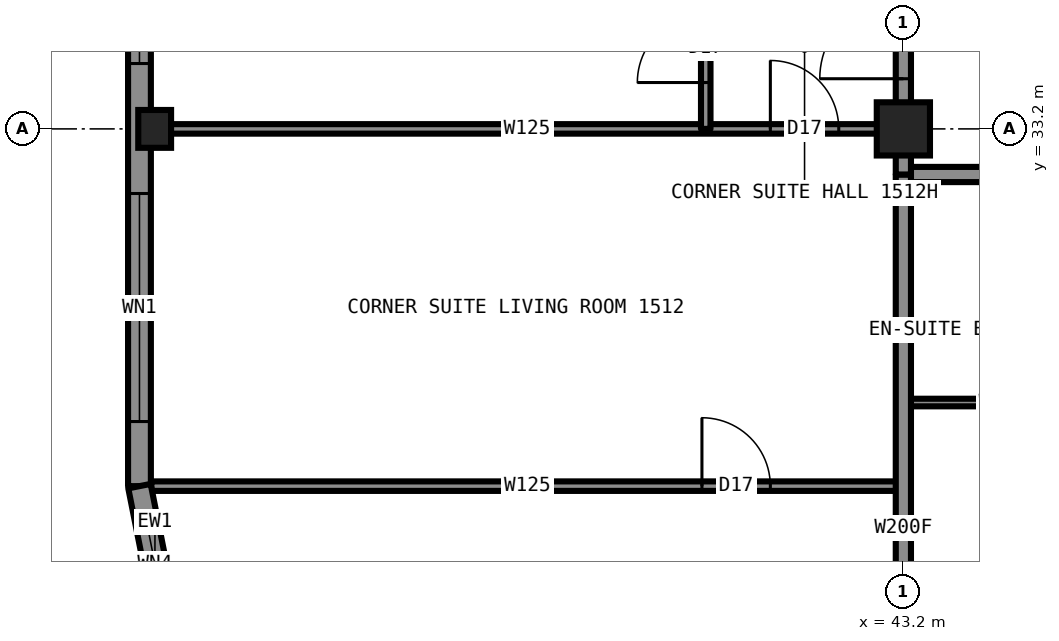
"""IFC4 building model, lengths in metres.
Left out: names, types, materials, properties, quantities, classifications, styles, units other than length and angle.
Written with IfcOpenShell. Run it as: python <this file> out.ifc"""

import sys

from ifc_helpers import new_model, si_unit, direction, frame, frame_2d, origin, origin_2d, place, context, subcontext, project, spatial, rectangle, hollow_rectangle, i_section, extrude, element, fill, save


model = new_model("IFC4")
c1 = context("Model", 3, precision=1e-05, world=origin(), true_north=direction((0.0, 1.0)))
c2 = subcontext(c1, "Body", "Model", "MODEL_VIEW")
j1 = project(units=[si_unit("LENGTHUNIT", "METRE"), si_unit("PLANEANGLEUNIT", "RADIAN")], contexts=[c1])
p1 = place(None, origin())
s1 = spatial("IfcSite", under=j1, at=p1, CompositionType="ELEMENT")
p2 = place(p1, origin())
s2 = spatial("IfcBuilding", under=s1, at=p2, CompositionType="ELEMENT")
p3 = place(p2, frame((0.0, 0.0, 60.0)))
s3 = spatial("IfcBuildingStorey", under=s2, at=p3, CompositionType="ELEMENT", Elevation=60.0)
p4 = place(p3, frame((33.35, 33.2, 0.0), z_axis=(0.0, 0.0, 1.0), x_axis=(1.0, 0.0, 0.0)))
e1 = element("IfcColumn", 1, at=p4, inside=s3, PredefinedType="COLUMN", context=c2, shape_type="SweptSolid", body=[
    extrude(i_section(OverallWidth=0.432, OverallDepth=0.498, WebThickness=0.056, FlangeThickness=0.089, at=origin_2d()), origin(), (0.0, 0.0, 1.0), 3.5),
])
p5 = place(p3, frame((43.2, 33.2, 0.0), z_axis=(0.0, 0.0, 1.0), x_axis=(1.0, 0.0, 0.0)))
e2 = element("IfcColumn", 2, at=p5, inside=s3, PredefinedType="COLUMN", context=c2, shape_type="SweptSolid", body=[
    extrude(hollow_rectangle(XDim=0.7, YDim=0.7, WallThickness=0.06, at=origin_2d()), origin(), (0.0, 0.0, 1.0), 3.5),
])
p6 = place(p3, frame((33.3, 33.2, 0.0), z_axis=(0.0, 0.0, 1.0), x_axis=(1.0, 0.0, 0.0)))
e3 = element("IfcWall", 3, at=p6, inside=s3, PredefinedType="PARTITIONING", context=c2, shape_type="SweptSolid", body=[
    extrude(rectangle(XDim=9.9, YDim=0.125, at=frame_2d((4.95, 0.0))), origin(), (0.0, 0.0, 1.0), 2.573),
])
p7 = place(p6, frame((8.15, 0.0, 0.0)))
e4 = element("IfcOpeningElement", 4, at=p7, cuts=e3, PredefinedType="OPENING", context=c2, shape_type="SweptSolid", body=[
    extrude(rectangle(XDim=0.9, YDim=2.2, at=frame_2d((0.45, 1.1))), frame((0.0, 0.073, 0.0), z_axis=(0.0, -1.0, 0.0), x_axis=(1.0, 0.0, 0.0)), (0.0, 0.0, 1.0), 0.145),
])
p8 = place(p3, frame((43.2, 32.6, 0.0), z_axis=(0.0, 0.0, 1.0), x_axis=(1.0, 0.0, 0.0)))
e5 = element("IfcWall", 5, at=p8, inside=s3, PredefinedType="PARTITIONING", context=c2, shape_type="SweptSolid", body=[
    extrude(rectangle(XDim=23.6, YDim=0.2, at=frame_2d((11.8, 0.0))), origin(), (0.0, 0.0, 1.0), 3.33),
])
p9 = place(p8, frame((3.0, 0.0, 0.0)))
e6 = element("IfcOpeningElement", 6, at=p9, cuts=e5, PredefinedType="OPENING", context=c2, shape_type="SweptSolid", body=[
    extrude(rectangle(XDim=1.0, YDim=2.2, at=frame_2d((0.5, 1.1))), frame((0.0, 0.11, 0.0), z_axis=(0.0, -1.0, 0.0), x_axis=(1.0, 0.0, 0.0)), (0.0, 0.0, 1.0), 0.22),
])
p10 = place(p8, frame((12.44, 0.0, 0.0)))
e7 = element("IfcOpeningElement", 7, at=p10, cuts=e5, PredefinedType="OPENING", context=c2, shape_type="SweptSolid", body=[
    extrude(rectangle(XDim=1.0, YDim=2.2, at=frame_2d((0.5, 1.1))), frame((0.0, 0.11, 0.0), z_axis=(0.0, -1.0, 0.0), x_axis=(1.0, 0.0, 0.0)), (0.0, 0.0, 1.0), 0.22),
])
p11 = place(p8, frame((20.34, 0.0, 0.0)))
e8 = element("IfcOpeningElement", 8, at=p11, cuts=e5, PredefinedType="OPENING", context=c2, shape_type="SweptSolid", body=[
    extrude(rectangle(XDim=1.0, YDim=2.2, at=frame_2d((0.5, 1.1))), frame((0.0, 0.11, 0.0), z_axis=(0.0, -1.0, 0.0), x_axis=(1.0, 0.0, 0.0)), (0.0, 0.0, 1.0), 0.22),
])
p12 = place(p3, frame((43.2, 29.6, 0.0), z_axis=(0.0, 0.0, 1.0), x_axis=(1.0, 0.0, 0.0)))
e9 = element("IfcWall", 9, at=p12, inside=s3, PredefinedType="PARTITIONING", context=c2, shape_type="SweptSolid", body=[
    extrude(rectangle(XDim=2.6, YDim=0.1, at=frame_2d((1.3, 0.0))), origin(), (0.0, 0.0, 1.0), 3.33),
])
p13 = place(p3, frame((33.306, 28.5, 0.0), z_axis=(0.0, 0.0, 1.0), x_axis=(1.0, 0.0, 0.0)))
e10 = element("IfcWall", 10, at=p13, inside=s3, PredefinedType="PARTITIONING", context=c2, shape_type="SweptSolid", body=[
    extrude(rectangle(XDim=9.894, YDim=0.125, at=frame_2d((4.947, 0.0))), origin(), (0.0, 0.0, 1.0), 3.33),
])
p14 = place(p13, frame((7.244, 0.0, 0.0)))
e11 = element("IfcOpeningElement", 11, at=p14, cuts=e10, PredefinedType="OPENING", context=c2, shape_type="SweptSolid", body=[
    extrude(rectangle(XDim=0.9, YDim=2.2, at=frame_2d((0.45, 1.1))), frame((0.0, 0.073, 0.0), z_axis=(0.0, -1.0, 0.0), x_axis=(1.0, 0.0, 0.0)), (0.0, 0.0, 1.0), 0.145),
])
p15 = place(p3, frame((43.2, 33.22, 0.0), z_axis=(0.0, 0.0, 1.0), x_axis=(0.0, 1.0, 0.0)))
e12 = element("IfcWall", 12, at=p15, inside=s3, PredefinedType="PARTITIONING", context=c2, shape_type="SweptSolid", body=[
    extrude(rectangle(XDim=23.58, YDim=0.2, at=frame_2d((11.79, 0.0))), origin(), (0.0, 0.0, 1.0), 3.33),
])
p16 = place(p15, frame((7.7, 0.0, 0.0)))
e13 = element("IfcOpeningElement", 13, at=p16, cuts=e12, PredefinedType="OPENING", context=c2, shape_type="SweptSolid", body=[
    extrude(rectangle(XDim=1.0, YDim=2.2, at=frame_2d((0.5, 1.1))), frame((0.0, 0.11, 0.0), z_axis=(0.0, -1.0, 0.0), x_axis=(1.0, 0.0, 0.0)), (0.0, 0.0, 1.0), 0.22),
])
p17 = place(p15, frame((16.4, 0.0, 0.0)))
e14 = element("IfcOpeningElement", 14, at=p17, cuts=e12, PredefinedType="OPENING", context=c2, shape_type="SweptSolid", body=[
    extrude(rectangle(XDim=1.0, YDim=2.2, at=frame_2d((0.5, 1.1))), frame((0.0, 0.11, 0.0), z_axis=(0.0, -1.0, 0.0), x_axis=(1.0, 0.0, 0.0)), (0.0, 0.0, 1.0), 0.22),
])
p18 = place(p15, frame((21.82, 0.0, 0.0)))
e15 = element("IfcOpeningElement", 15, at=p18, cuts=e12, PredefinedType="OPENING", context=c2, shape_type="SweptSolid", body=[
    extrude(rectangle(XDim=1.1, YDim=2.2, at=frame_2d((0.55, 1.1))), frame((0.0, 0.11, 0.0), z_axis=(0.0, -1.0, 0.0), x_axis=(1.0, 0.0, 0.0)), (0.0, 0.0, 1.0), 0.22),
])
p19 = place(p15, frame((0.64, 0.0, 0.0)))
e16 = element("IfcOpeningElement", 16, at=p19, cuts=e12, PredefinedType="OPENING", context=c2, shape_type="SweptSolid", body=[
    extrude(rectangle(XDim=1.1, YDim=2.2, at=frame_2d((0.55, 1.1))), frame((0.0, 0.11, 0.0), z_axis=(0.0, -1.0, 0.0), x_axis=(1.0, 0.0, 0.0)), (0.0, 0.0, 1.0), 0.22),
])
p20 = place(p3, frame((43.2, 23.3, 0.0), z_axis=(0.0, 0.0, 1.0), x_axis=(0.0, 1.0, 0.0)))
e17 = element("IfcWall", 17, at=p20, inside=s3, PredefinedType="PARTITIONING", context=c2, shape_type="SweptSolid", body=[
    extrude(rectangle(XDim=9.3, YDim=0.2, at=frame_2d((4.65, 0.0))), origin(), (0.0, 0.0, 1.0), 2.573),
])
p21 = place(p3, frame((40.6, 33.2, 0.0), z_axis=(0.0, 0.0, 1.0), x_axis=(0.0, 1.0, 0.0)))
e18 = element("IfcWall", 18, at=p21, inside=s3, PredefinedType="PARTITIONING", context=c2, shape_type="SweptSolid", body=[
    extrude(rectangle(XDim=2.12, YDim=0.125, at=frame_2d((1.06, 0.0))), origin(), (0.0, 0.0, 1.0), 3.33),
])
p22 = place(p21, frame((0.61, 0.0, 0.0)))
e19 = element("IfcOpeningElement", 19, at=p22, cuts=e18, PredefinedType="OPENING", context=c2, shape_type="SweptSolid", body=[
    extrude(rectangle(XDim=0.9, YDim=2.2, at=frame_2d((0.45, 1.1))), frame((0.0, 0.073, 0.0), z_axis=(0.0, -1.0, 0.0), x_axis=(1.0, 0.0, 0.0)), (0.0, 0.0, 1.0), 0.145),
])
p23 = place(p3, frame((33.15, 61.5, 0.0), z_axis=(0.0, 0.0, 1.0), x_axis=(0.0, -1.0, 0.0)))
e20 = element("IfcWall", 20, at=p23, inside=s3, PredefinedType="SOLIDWALL", context=c2, shape_type="SweptSolid", body=[
    extrude(rectangle(XDim=33.0, YDim=0.3, at=frame_2d((16.5, 0.0))), origin(), (0.0, 0.0, 1.0), 2.83),
])
p24 = place(p23, frame((0.85, 0.0, 0.5)))
e21 = element("IfcOpeningElement", 21, at=p24, cuts=e20, PredefinedType="OPENING", context=c2, shape_type="SweptSolid", body=[
    extrude(rectangle(XDim=3.0, YDim=2.0, at=frame_2d((1.5, 1.0))), frame((0.0, 0.16, 0.0), z_axis=(0.0, -1.0, 0.0), x_axis=(1.0, 0.0, 0.0)), (0.0, 0.0, 1.0), 0.32),
])
p25 = place(p23, frame((5.56, 0.0, 0.5)))
e22 = element("IfcOpeningElement", 22, at=p25, cuts=e20, PredefinedType="OPENING", context=c2, shape_type="SweptSolid", body=[
    extrude(rectangle(XDim=3.0, YDim=2.0, at=frame_2d((1.5, 1.0))), frame((0.0, 0.16, 0.0), z_axis=(0.0, -1.0, 0.0), x_axis=(1.0, 0.0, 0.0)), (0.0, 0.0, 1.0), 0.32),
])
p26 = place(p23, frame((10.28, 0.0, 0.5)))
e23 = element("IfcOpeningElement", 23, at=p26, cuts=e20, PredefinedType="OPENING", context=c2, shape_type="SweptSolid", body=[
    extrude(rectangle(XDim=1.2, YDim=1.7, at=frame_2d((0.6, 0.85))), frame((0.0, 0.16, 0.0), z_axis=(0.0, -1.0, 0.0), x_axis=(1.0, 0.0, 0.0)), (0.0, 0.0, 1.0), 0.32),
])
p27 = place(p23, frame((15.0, 0.0, 0.5)))
e24 = element("IfcOpeningElement", 24, at=p27, cuts=e20, PredefinedType="OPENING", context=c2, shape_type="SweptSolid", body=[
    extrude(rectangle(XDim=3.0, YDim=2.0, at=frame_2d((1.5, 1.0))), frame((0.0, 0.16, 0.0), z_axis=(0.0, -1.0, 0.0), x_axis=(1.0, 0.0, 0.0)), (0.0, 0.0, 1.0), 0.32),
])
p28 = place(p23, frame((21.52, 0.0, 0.5)))
e25 = element("IfcOpeningElement", 25, at=p28, cuts=e20, PredefinedType="OPENING", context=c2, shape_type="SweptSolid", body=[
    extrude(rectangle(XDim=1.2, YDim=1.7, at=frame_2d((0.6, 0.85))), frame((0.0, 0.16, 0.0), z_axis=(0.0, -1.0, 0.0), x_axis=(1.0, 0.0, 0.0)), (0.0, 0.0, 1.0), 0.32),
])
p29 = place(p23, frame((24.44, 0.0, 0.5)))
e26 = element("IfcOpeningElement", 26, at=p29, cuts=e20, PredefinedType="OPENING", context=c2, shape_type="SweptSolid", body=[
    extrude(rectangle(XDim=3.0, YDim=2.0, at=frame_2d((1.5, 1.0))), frame((0.0, 0.16, 0.0), z_axis=(0.0, -1.0, 0.0), x_axis=(1.0, 0.0, 0.0)), (0.0, 0.0, 1.0), 0.32),
])
p30 = place(p23, frame((29.15, 0.0, 0.5)))
e27 = element("IfcOpeningElement", 27, at=p30, cuts=e20, PredefinedType="OPENING", context=c2, shape_type="SweptSolid", body=[
    extrude(rectangle(XDim=3.0, YDim=2.0, at=frame_2d((1.5, 1.0))), frame((0.0, 0.16, 0.0), z_axis=(0.0, -1.0, 0.0), x_axis=(1.0, 0.0, 0.0)), (0.0, 0.0, 1.0), 0.32),
])
p31 = place(p23, frame((11.48, 0.0, 0.5)))
e28 = element("IfcOpeningElement", 28, at=p31, cuts=e20, PredefinedType="OPENING", context=c2, shape_type="SweptSolid", body=[
    extrude(rectangle(XDim=0.6, YDim=0.8, at=frame_2d((0.3, 0.4))), frame((0.0, 0.16, 0.0), z_axis=(0.0, -1.0, 0.0), x_axis=(1.0, 0.0, 0.0)), (0.0, 0.0, 1.0), 0.32),
])
p32 = place(p23, frame((20.87, 0.0, 0.5)))
e29 = element("IfcOpeningElement", 29, at=p32, cuts=e20, PredefinedType="OPENING", context=c2, shape_type="SweptSolid", body=[
    extrude(rectangle(XDim=0.6, YDim=0.8, at=frame_2d((0.3, 0.4))), frame((0.0, 0.16, 0.0), z_axis=(0.0, -1.0, 0.0), x_axis=(1.0, 0.0, 0.0)), (0.0, 0.0, 1.0), 0.32),
])
p33 = place(p3, frame((33.15, 28.5, 0.0), z_axis=(0.0, 0.0, 1.0), x_axis=(0.195081421501, -0.980787050784, 0.0)))
e30 = element("IfcWall", 30, at=p33, inside=s3, PredefinedType="SOLIDWALL", context=c2, shape_type="SweptSolid", body=[
    extrude(rectangle(XDim=2.087, YDim=0.3, at=frame_2d((1.044, 0.0))), origin(), (0.0, 0.0, 1.0), 3.33),
])
p34 = place(p33, frame((0.444, 0.0, 0.5)))
e31 = element("IfcOpeningElement", 31, at=p34, cuts=e30, PredefinedType="OPENING", context=c2, shape_type="SweptSolid", body=[
    extrude(rectangle(XDim=1.2, YDim=2.0, at=frame_2d((0.6, 1.0))), frame((0.0, 0.16, 0.0), z_axis=(0.0, -1.0, 0.0), x_axis=(1.0, 0.0, 0.0)), (0.0, 0.0, 1.0), 0.32),
])
p35 = place(p3, frame((43.2, 32.6, 0.0), z_axis=(0.0, 0.0, 1.0), x_axis=(0.0, 1.0, 0.0)))
e32 = element("IfcWall", 32, at=p35, inside=s3, PredefinedType="PARTITIONING", context=c2, shape_type="SweptSolid", body=[
    extrude(rectangle(XDim=0.62, YDim=0.2, at=frame_2d((0.31, 0.0))), origin(), (0.0, 0.0, 1.0), 2.573),
])
p36 = place(p7, origin())
e33 = element("IfcDoor", 33, at=p36, inside=s3, OperationType="SINGLE_SWING_LEFT", PredefinedType="DOOR", context=c2, shape_type="SweptSolid", body=[
    extrude(rectangle(XDim=0.9, YDim=2.2, at=frame_2d((0.45, 1.1))), frame((0.0, 0.025, 0.0), z_axis=(0.0, -1.0, 0.0), x_axis=(1.0, 0.0, 0.0)), (0.0, 0.0, 1.0), 0.05),
])
fill(e4, e33)
p37 = place(p19, origin())
e34 = element("IfcDoor", 34, at=p37, inside=s3, OperationType="SINGLE_SWING_LEFT", PredefinedType="DOOR", context=c2, shape_type="SweptSolid", body=[
    extrude(rectangle(XDim=1.1, YDim=2.2, at=frame_2d((0.55, 1.1))), frame((0.0, 0.025, 0.0), z_axis=(0.0, -1.0, 0.0), x_axis=(1.0, 0.0, 0.0)), (0.0, 0.0, 1.0), 0.05),
])
fill(e16, e34)
p38 = place(p14, origin())
e35 = element("IfcDoor", 35, at=p38, inside=s3, OperationType="SINGLE_SWING_LEFT", PredefinedType="DOOR", context=c2, shape_type="SweptSolid", body=[
    extrude(rectangle(XDim=0.9, YDim=2.2, at=frame_2d((0.45, 1.1))), frame((0.0, 0.025, 0.0), z_axis=(0.0, -1.0, 0.0), x_axis=(1.0, 0.0, 0.0)), (0.0, 0.0, 1.0), 0.05),
])
fill(e11, e35)
p39 = place(p22, origin())
e36 = element("IfcDoor", 36, at=p39, inside=s3, OperationType="SINGLE_SWING_LEFT", PredefinedType="DOOR", context=c2, shape_type="SweptSolid", body=[
    extrude(rectangle(XDim=0.9, YDim=2.2, at=frame_2d((0.45, 1.1))), frame((0.0, 0.025, 0.0), z_axis=(0.0, -1.0, 0.0), x_axis=(1.0, 0.0, 0.0)), (0.0, 0.0, 1.0), 0.05),
])
fill(e19, e36)
p40 = place(p29, origin())
e37 = element("IfcWindow", 37, at=p40, inside=s3, PartitioningType="SINGLE_PANEL", PredefinedType="WINDOW", context=c2, shape_type="SweptSolid", body=[
    extrude(rectangle(XDim=3.0, YDim=2.0, at=frame_2d((1.5, 1.0))), frame((0.0, 0.03, 0.0), z_axis=(0.0, -1.0, 0.0), x_axis=(1.0, 0.0, 0.0)), (0.0, 0.0, 1.0), 0.06),
])
fill(e26, e37)
p41 = place(p30, origin())
e38 = element("IfcWindow", 38, at=p41, inside=s3, PartitioningType="SINGLE_PANEL", PredefinedType="WINDOW", context=c2, shape_type="SweptSolid", body=[
    extrude(rectangle(XDim=3.0, YDim=2.0, at=frame_2d((1.5, 1.0))), frame((0.0, 0.03, 0.0), z_axis=(0.0, -1.0, 0.0), x_axis=(1.0, 0.0, 0.0)), (0.0, 0.0, 1.0), 0.06),
])
fill(e27, e38)
p42 = place(p34, origin())
e39 = element("IfcWindow", 39, at=p42, inside=s3, PartitioningType="SINGLE_PANEL", PredefinedType="WINDOW", context=c2, shape_type="SweptSolid", body=[
    extrude(rectangle(XDim=1.2, YDim=2.0, at=frame_2d((0.6, 1.0))), frame((0.0, 0.03, 0.0), z_axis=(0.0, -1.0, 0.0), x_axis=(1.0, 0.0, 0.0)), (0.0, 0.0, 1.0), 0.06),
])
fill(e31, e39)
save(model, sys.argv[1])
